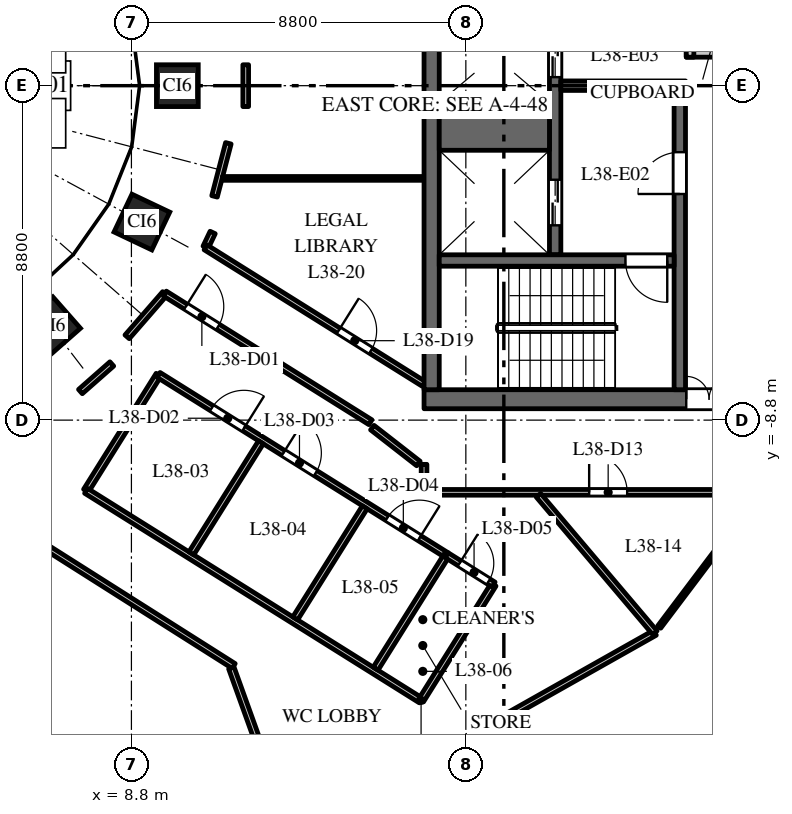
"""IFC4 building model, lengths in metres.
Left out: names, types, materials, properties, quantities, classifications, styles, units other than length and angle.
Written with IfcOpenShell. Run it as: python <this file> out.ifc"""

import sys

from ifc_helpers import new_model, si_unit, direction, frame, frame_2d, origin, origin_2d, place, context, subcontext, project, spatial, rectangle, extrude, element, fill, save


model = new_model("IFC4")
c1 = context("Model", 3, precision=1e-05, world=origin(), true_north=direction((0.0, 1.0)))
c2 = subcontext(c1, "Body", "Model", "MODEL_VIEW")
j1 = project(units=[si_unit("LENGTHUNIT", "METRE"), si_unit("PLANEANGLEUNIT", "RADIAN")], contexts=[c1])
p1 = place(None, origin())
s1 = spatial("IfcSite", under=j1, at=p1, CompositionType="ELEMENT")
p2 = place(p1, origin())
s2 = spatial("IfcBuilding", under=s1, at=p2, CompositionType="ELEMENT")
p3 = place(p2, frame((0.0, 0.0, 166.0)))
s3 = spatial("IfcBuildingStorey", under=s2, at=p3, CompositionType="ELEMENT", Elevation=166.0)
for number, where, z_axis, x_axis in (
    (1, (10.008, 0.0, 0.0), (0.0, 0.0, 1.0), (0.0, 1.0, 0.0)),
    (2, (6.682, -6.334, 0.0), (0.0, 0.0, 1.0), (0.751, 0.66, 0.0)),
    (3, (9.076, -3.588, 0.0), (0.0, 0.0, 1.0), (0.429, 0.903, 0.0)),
):
    element("IfcColumn", number, at=place(p3, frame(where, z_axis=z_axis, x_axis=x_axis)), inside=s3, PredefinedType="COLUMN", context=c2, shape_type="SweptSolid", body=[
        extrude(rectangle(XDim=1.1, YDim=1.1, at=origin_2d()), origin(), (0.0, 0.0, 1.0), 4.0),
    ])
p4 = place(p3, frame((16.5, -8.25, 0.0), z_axis=(0.0, 0.0, 1.0), x_axis=(1.0, 0.0, 0.0)))
e4 = element("IfcWall", 4, at=p4, inside=s3, PredefinedType="SHEAR", context=c2, shape_type="SweptSolid", body=[
    extrude(rectangle(XDim=15.0, YDim=0.5, at=frame_2d((7.5, 0.0))), origin(), (0.0, 0.0, 1.0), 3.7),
])
p5 = place(p4, frame((6.9, 0.0, 0.0)))
e5 = element("IfcOpeningElement", 5, at=p5, cuts=e4, PredefinedType="OPENING", context=c2, shape_type="SweptSolid", body=[
    extrude(rectangle(XDim=1.2, YDim=2.1, at=frame_2d((0.6, 1.05))), frame((0.0, 0.26, 0.0), z_axis=(0.0, -1.0, 0.0), x_axis=(1.0, 0.0, 0.0)), (0.0, 0.0, 1.0), 0.52),
])
p6 = place(p4, frame((12.95, 0.0, 0.0)))
e6 = element("IfcOpeningElement", 6, at=p6, cuts=e4, PredefinedType="OPENING", context=c2, shape_type="SweptSolid", body=[
    extrude(rectangle(XDim=0.9, YDim=2.1, at=frame_2d((0.45, 1.05))), frame((0.0, 0.26, 0.0), z_axis=(0.0, -1.0, 0.0), x_axis=(1.0, 0.0, 0.0)), (0.0, 0.0, 1.0), 0.52),
])
p7 = place(p3, frame((19.95, -4.45, 0.0), z_axis=(0.0, 0.0, 1.0), x_axis=(0.0, 1.0, 0.0)))
e7 = element("IfcWall", 7, at=p7, inside=s3, PredefinedType="SHEAR", context=c2, shape_type="SweptSolid", body=[
    extrude(rectangle(XDim=8.9, YDim=0.3, at=frame_2d((4.45, 0.0))), origin(), (0.0, 0.0, 1.0), 3.7),
])
p8 = place(p7, frame((0.775, 0.0, 0.0)))
e8 = element("IfcOpeningElement", 8, at=p8, cuts=e7, PredefinedType="OPENING", context=c2, shape_type="SweptSolid", body=[
    extrude(rectangle(XDim=1.2, YDim=2.1, at=frame_2d((0.6, 1.05))), frame((0.0, 0.16, 0.0), z_axis=(0.0, -1.0, 0.0), x_axis=(1.0, 0.0, 0.0)), (0.0, 0.0, 1.0), 0.32),
])
p9 = place(p7, frame((4.675, 0.0, 0.0)))
e9 = element("IfcOpeningElement", 9, at=p9, cuts=e7, PredefinedType="OPENING", context=c2, shape_type="SweptSolid", body=[
    extrude(rectangle(XDim=1.1, YDim=2.1, at=frame_2d((0.55, 1.05))), frame((0.0, 0.16, 0.0), z_axis=(0.0, -1.0, 0.0), x_axis=(1.0, 0.0, 0.0)), (0.0, 0.0, 1.0), 0.32),
])
p10 = place(p7, frame((7.25, 0.0, 0.0)))
e10 = element("IfcOpeningElement", 10, at=p10, cuts=e7, PredefinedType="OPENING", context=c2, shape_type="SweptSolid", body=[
    extrude(rectangle(XDim=1.1, YDim=2.1, at=frame_2d((0.55, 1.05))), frame((0.0, 0.16, 0.0), z_axis=(0.0, -1.0, 0.0), x_axis=(1.0, 0.0, 0.0)), (0.0, 0.0, 1.0), 0.32),
])
p11 = place(p3, frame((20.1, 0.0, 0.0), z_axis=(0.0, 0.0, 1.0), x_axis=(1.0, 0.0, 0.0)))
e11 = element("IfcWall", 11, at=p11, inside=s3, PredefinedType="SHEAR", context=c2, shape_type="SweptSolid", body=[
    extrude(rectangle(XDim=3.28, YDim=0.25, at=frame_2d((1.64, 0.0))), origin(), (0.0, 0.0, 1.0), 3.7),
])
p12 = place(p3, frame((16.7, -8.0, 0.0), z_axis=(0.0, 0.0, 1.0), x_axis=(0.0, 1.0, 0.0)))
e12 = element("IfcWall", 12, at=p12, inside=s3, PredefinedType="SHEAR", context=c2, shape_type="SweptSolid", body=[
    extrude(rectangle(XDim=16.0, YDim=0.4, at=frame_2d((8.0, 0.0))), origin(), (0.0, 0.0, 1.0), 3.7),
])
p13 = place(p3, frame((23.4, 0.85, 0.0), z_axis=(0.0, 0.0, 1.0), x_axis=(1.0, 0.0, 0.0)))
e13 = element("IfcWall", 13, at=p13, inside=s3, PredefinedType="PARTITIONING", context=c2, shape_type="SweptSolid", body=[
    extrude(rectangle(XDim=1.2, YDim=0.2, at=frame_2d((0.6, 0.0))), origin(), (0.0, 0.0, 1.0), 3.7),
])
p14 = place(p3, frame((23.5, 0.75, 0.0), z_axis=(0.0, 0.0, 1.0), x_axis=(0.0, 1.0, 0.0)))
e14 = element("IfcWall", 14, at=p14, inside=s3, PredefinedType="PARTITIONING", context=c2, shape_type="SweptSolid", body=[
    extrude(rectangle(XDim=1.6, YDim=0.2, at=frame_2d((0.8, 0.0))), origin(), (0.0, 0.0, 1.0), 3.7),
])
p15 = place(p14, frame((0.25, 0.0, 0.0)))
e15 = element("IfcOpeningElement", 15, at=p15, cuts=e14, PredefinedType="OPENING", context=c2, shape_type="SweptSolid", body=[
    extrude(rectangle(XDim=0.9, YDim=2.1, at=frame_2d((0.45, 1.05))), frame((0.0, 0.11, 0.0), z_axis=(0.0, -1.0, 0.0), x_axis=(1.0, 0.0, 0.0)), (0.0, 0.0, 1.0), 0.22),
])
p16 = place(p3, frame((16.9, -1.075, 0.0), z_axis=(0.0, 0.0, 1.0), x_axis=(1.0, 0.0, 0.0)))
e16 = element("IfcWall", 16, at=p16, inside=s3, PredefinedType="SHEAR", context=c2, shape_type="SweptSolid", body=[
    extrude(rectangle(XDim=2.9, YDim=1.25, at=frame_2d((1.45, 0.0))), origin(), (0.0, 0.0, 1.0), 3.7),
])
p17 = place(p3, frame((23.23, -8.0, 0.0), z_axis=(0.0, 0.0, 1.0), x_axis=(0.0, 1.0, 0.0)))
e17 = element("IfcWall", 17, at=p17, inside=s3, PredefinedType="SHEAR", context=c2, shape_type="SweptSolid", body=[
    extrude(rectangle(XDim=7.875, YDim=0.3, at=frame_2d((3.938, 0.0))), origin(), (0.0, 0.0, 1.0), 3.7),
])
p18 = place(p17, frame((5.15, 0.0, 0.0)))
e18 = element("IfcOpeningElement", 18, at=p18, cuts=e17, PredefinedType="OPENING", context=c2, shape_type="SweptSolid", body=[
    extrude(rectangle(XDim=1.1, YDim=2.1, at=frame_2d((0.55, 1.05))), frame((0.0, 0.16, 0.0), z_axis=(0.0, -1.0, 0.0), x_axis=(1.0, 0.0, 0.0)), (0.0, 0.0, 1.0), 0.32),
])
p19 = place(p3, frame((16.9, -4.6, 0.0), z_axis=(0.0, 0.0, 1.0), x_axis=(1.0, 0.0, 0.0)))
e19 = element("IfcWall", 19, at=p19, inside=s3, PredefinedType="SHEAR", context=c2, shape_type="SweptSolid", body=[
    extrude(rectangle(XDim=6.18, YDim=0.3, at=frame_2d((3.09, 0.0))), origin(), (0.0, 0.0, 1.0), 3.7),
])
p20 = place(p19, frame((4.9, 0.0, 0.0)))
e20 = element("IfcOpeningElement", 20, at=p20, cuts=e19, PredefinedType="OPENING", context=c2, shape_type="SweptSolid", body=[
    extrude(rectangle(XDim=1.1, YDim=2.1, at=frame_2d((0.55, 1.05))), frame((0.0, 0.16, 0.0), z_axis=(0.0, -1.0, 0.0), x_axis=(1.0, 0.0, 0.0)), (0.0, 0.0, 1.0), 0.32),
])
p21 = place(p3, frame((3.036, -9.915, 0.0), z_axis=(0.0, 0.0, 1.0), x_axis=(0.844814664865, -0.535059045367, 0.0)))
e21 = element("IfcWall", 21, at=p21, inside=s3, PredefinedType="PARTITIONING", context=c2, shape_type="SweptSolid", body=[
    extrude(rectangle(XDim=10.008, YDim=0.15, at=frame_2d((5.004, 0.0))), origin(), (0.0, 0.0, 1.0), 2.85),
])
p22 = place(p3, frame((7.458, -8.049, 0.0), z_axis=(0.0, 0.0, 1.0), x_axis=(0.75060787095, 0.660747927782, 0.0)))
e22 = element("IfcWall", 22, at=p22, inside=s3, PredefinedType="PARTITIONING", context=c2, shape_type="SweptSolid", body=[
    extrude(rectangle(XDim=1.1, YDim=0.15, at=frame_2d((0.55, 0.0))), origin(), (0.0, 0.0, 1.0), 3.7),
])
p23 = place(p3, frame((7.605, -10.659, 0.0), z_axis=(0.0, 0.0, 1.0), x_axis=(0.530602380468, 0.847620855006, 0.0)))
e23 = element("IfcWall", 23, at=p23, inside=s3, PredefinedType="PARTITIONING", context=c2, shape_type="SweptSolid", body=[
    extrude(rectangle(XDim=3.6, YDim=0.15, at=frame_2d((1.8, 0.0))), origin(), (0.0, 0.0, 1.0), 3.7),
])
p24 = place(p3, frame((7.608, -10.661, 0.0), z_axis=(0.0, 0.0, 1.0), x_axis=(0.847562482532, -0.530695617284, 0.0)))
e24 = element("IfcWall", 24, at=p24, inside=s3, PredefinedType="PARTITIONING", context=c2, shape_type="SweptSolid", body=[
    extrude(rectangle(XDim=10.392, YDim=0.15, at=frame_2d((5.196, 0.0))), origin(), (0.0, 0.0, 1.0), 3.7),
])
p25 = place(p3, frame((8.687, -6.609, 0.0), z_axis=(0.0, 0.0, 1.0), x_axis=(0.656454677423, 0.75436546613, 0.0)))
e25 = element("IfcWall", 25, at=p25, inside=s3, PredefinedType="PARTITIONING", context=c2, shape_type="SweptSolid", body=[
    extrude(rectangle(XDim=1.511, YDim=0.15, at=frame_2d((0.755, 0.0))), origin(), (0.0, 0.0, 1.0), 3.7),
])
p26 = place(p3, frame((9.514, -7.61, 0.0), z_axis=(0.0, 0.0, 1.0), x_axis=(0.847740567707, -0.530411095155, 0.0)))
e26 = element("IfcWall", 26, at=p26, inside=s3, PredefinedType="PARTITIONING", context=c2, shape_type="SweptSolid", body=[
    extrude(rectangle(XDim=8.944, YDim=0.15, at=frame_2d((4.472, 0.0))), origin(), (0.0, 0.0, 1.0), 3.7),
])
p27 = place(p26, frame((1.65, 0.0, 0.0)))
e27 = element("IfcOpeningElement", 27, at=p27, cuts=e26, PredefinedType="OPENING", context=c2, shape_type="SweptSolid", body=[
    extrude(rectangle(XDim=1.0, YDim=2.1, at=frame_2d((0.5, 1.05))), frame((0.0, 0.085, 0.0), z_axis=(0.0, -1.0, 0.0), x_axis=(1.0, 0.0, 0.0)), (0.0, 0.0, 1.0), 0.17),
])
p28 = place(p26, frame((3.874, 0.0, 0.0)))
e28 = element("IfcOpeningElement", 28, at=p28, cuts=e26, PredefinedType="OPENING", context=c2, shape_type="SweptSolid", body=[
    extrude(rectangle(XDim=1.0, YDim=2.1, at=frame_2d((0.5, 1.05))), frame((0.0, 0.085, 0.0), z_axis=(0.0, -1.0, 0.0), x_axis=(1.0, 0.0, 0.0)), (0.0, 0.0, 1.0), 0.17),
])
p29 = place(p26, frame((7.098, 0.0, 0.0)))
e29 = element("IfcOpeningElement", 29, at=p29, cuts=e26, PredefinedType="OPENING", context=c2, shape_type="SweptSolid", body=[
    extrude(rectangle(XDim=1.0, YDim=2.1, at=frame_2d((0.5, 1.05))), frame((0.0, 0.085, 0.0), z_axis=(0.0, -1.0, 0.0), x_axis=(1.0, 0.0, 0.0)), (0.0, 0.0, 1.0), 0.17),
])
p30 = place(p3, frame((9.679, -5.469, 0.0), z_axis=(0.0, 0.0, 1.0), x_axis=(0.847602682855, -0.530631408811, 0.0)))
e30 = element("IfcWall", 30, at=p30, inside=s3, PredefinedType="PARTITIONING", context=c2, shape_type="SweptSolid", body=[
    extrude(rectangle(XDim=6.383, YDim=0.15, at=frame_2d((3.191, 0.0))), origin(), (0.0, 0.0, 1.0), 3.7),
])
p31 = place(p30, frame((0.65, 0.0, 0.0)))
e31 = element("IfcOpeningElement", 31, at=p31, cuts=e30, PredefinedType="OPENING", context=c2, shape_type="SweptSolid", body=[
    extrude(rectangle(XDim=1.0, YDim=2.1, at=frame_2d((0.5, 1.05))), frame((0.0, 0.085, 0.0), z_axis=(0.0, -1.0, 0.0), x_axis=(1.0, 0.0, 0.0)), (0.0, 0.0, 1.0), 0.17),
])
p32 = place(p3, frame((10.377, -12.306, 0.0), z_axis=(0.0, 0.0, 1.0), x_axis=(0.530889428354, 0.847441098167, 0.0)))
e32 = element("IfcWall", 32, at=p32, inside=s3, PredefinedType="PARTITIONING", context=c2, shape_type="SweptSolid", body=[
    extrude(rectangle(XDim=3.449, YDim=0.15, at=frame_2d((1.725, 0.0))), origin(), (0.0, 0.0, 1.0), 3.7),
])
p33 = place(p3, frame((10.752, -4.254, 0.0), z_axis=(0.0, 0.0, 1.0), x_axis=(0.429758433873, 0.90294390109, 0.0)))
e33 = element("IfcWall", 33, at=p33, inside=s3, PredefinedType="PARTITIONING", context=c2, shape_type="SweptSolid", body=[
    extrude(rectangle(XDim=0.433, YDim=0.15, at=frame_2d((0.216, 0.0))), origin(), (0.0, 0.0, 1.0), 3.7),
])
p34 = place(p3, frame((10.752, -4.254, 0.0), z_axis=(0.0, 0.0, 1.0), x_axis=(0.847690706888, -0.530490777917, 0.0)))
e34 = element("IfcWall", 34, at=p34, inside=s3, PredefinedType="PARTITIONING", context=c2, shape_type="SweptSolid", body=[
    extrude(rectangle(XDim=6.781, YDim=0.15, at=frame_2d((3.39, 0.0))), origin(), (0.0, 0.0, 1.0), 3.7),
])
p35 = place(p34, frame((4.129, 0.0, 0.0)))
e35 = element("IfcOpeningElement", 35, at=p35, cuts=e34, PredefinedType="OPENING", context=c2, shape_type="SweptSolid", body=[
    extrude(rectangle(XDim=1.0, YDim=2.1, at=frame_2d((0.5, 1.05))), frame((0.0, 0.085, 0.0), z_axis=(0.0, -1.0, 0.0), x_axis=(1.0, 0.0, 0.0)), (0.0, 0.0, 1.0), 0.17),
])
p36 = place(p3, frame((10.987, -2.913, 0.0), z_axis=(0.0, 0.0, 1.0), x_axis=(0.252153395539, 0.967687276509, 0.0)))
e36 = element("IfcWall", 36, at=p36, inside=s3, PredefinedType="PARTITIONING", context=c2, shape_type="SweptSolid", body=[
    extrude(rectangle(XDim=1.444, YDim=0.15, at=frame_2d((0.722, 0.0))), origin(), (0.0, 0.0, 1.0), 3.7),
])
p37 = place(p3, frame((11.193, -2.44, 0.0), z_axis=(0.0, 0.0, 1.0), x_axis=(1.0, 0.0, 0.0)))
e37 = element("IfcWall", 37, at=p37, inside=s3, PredefinedType="PARTITIONING", context=c2, shape_type="SweptSolid", body=[
    extrude(rectangle(XDim=5.307, YDim=0.1, at=frame_2d((2.653, 0.0))), origin(), (0.0, 0.0, 1.0), 3.7),
])
p38 = place(p3, frame((11.429, -15.32, 0.0), z_axis=(0.0, 0.0, 1.0), x_axis=(0.338520464006, -0.940959029634, 0.0)))
e38 = element("IfcWall", 38, at=p38, inside=s3, PredefinedType="PARTITIONING", context=c2, shape_type="SweptSolid", body=[
    extrude(rectangle(XDim=4.735, YDim=0.15, at=frame_2d((2.368, 0.0))), origin(), (0.0, 0.0, 1.0), 3.7),
])
p39 = place(p3, frame((11.808, -0.55, 0.0), z_axis=(0.0, 0.0, 1.0), x_axis=(0.0, 1.0, 0.0)))
e39 = element("IfcWall", 39, at=p39, inside=s3, PredefinedType="PARTITIONING", context=c2, shape_type="SweptSolid", body=[
    extrude(rectangle(XDim=1.1, YDim=0.15, at=frame_2d((0.55, 0.0))), origin(), (0.0, 0.0, 1.0), 3.7),
])
p40 = place(p3, frame((13.034, -19.779, 0.0), z_axis=(0.0, 0.0, 1.0), x_axis=(0.870903388322, 0.491454258512, 0.0)))
e40 = element("IfcWall", 40, at=p40, inside=s3, PredefinedType="PARTITIONING", context=c2, shape_type="SweptSolid", body=[
    extrude(rectangle(XDim=10.955, YDim=0.15, at=frame_2d((5.478, 0.0))), origin(), (0.0, 0.0, 1.0), 3.7),
])
p41 = place(p3, frame((13.11, -14.017, 0.0), z_axis=(0.0, 0.0, 1.0), x_axis=(0.530603340991, 0.847620253727, 0.0)))
e41 = element("IfcWall", 41, at=p41, inside=s3, PredefinedType="PARTITIONING", context=c2, shape_type="SweptSolid", body=[
    extrude(rectangle(XDim=3.448, YDim=0.15, at=frame_2d((1.724, 0.0))), origin(), (0.0, 0.0, 1.0), 3.7),
])
p42 = place(p3, frame((15.226, -15.341, 0.0), z_axis=(0.0, 0.0, 1.0), x_axis=(0.530602850446, 0.847620560805, 0.0)))
e42 = element("IfcWall", 42, at=p42, inside=s3, PredefinedType="PARTITIONING", context=c2, shape_type="SweptSolid", body=[
    extrude(rectangle(XDim=3.524, YDim=0.15, at=frame_2d((1.762, 0.0))), origin(), (0.0, 0.0, 1.0), 3.7),
])
p43 = place(p3, frame((16.422, -16.175, 0.0), z_axis=(0.0, 0.0, 1.0), x_axis=(0.530578570881, 0.84763575911, 0.0)))
e43 = element("IfcWall", 43, at=p43, inside=s3, PredefinedType="PARTITIONING", context=c2, shape_type="SweptSolid", body=[
    extrude(rectangle(XDim=3.596, YDim=0.15, at=frame_2d((1.798, 0.0))), origin(), (0.0, 0.0, 1.0), 3.7),
])
p44 = place(p3, frame((16.5, -10.7, 0.0), z_axis=(0.0, 0.0, 1.0), x_axis=(0.0, 1.0, 0.0)))
e44 = element("IfcWall", 44, at=p44, inside=s3, PredefinedType="PARTITIONING", context=c2, shape_type="SweptSolid", body=[
    extrude(rectangle(XDim=0.736, YDim=0.15, at=frame_2d((0.368, 0.0))), origin(), (0.0, 0.0, 1.0), 3.7),
])
p45 = place(p3, frame((16.5, -10.7, 0.0), z_axis=(0.0, 0.0, 1.0), x_axis=(1.0, 0.0, 0.0)))
e45 = element("IfcWall", 45, at=p45, inside=s3, PredefinedType="PARTITIONING", context=c2, shape_type="SweptSolid", body=[
    extrude(rectangle(XDim=15.0, YDim=0.15, at=frame_2d((7.5, 0.0))), origin(), (0.0, 0.0, 1.0), 2.75),
])
p46 = place(p45, frame((4.345, 0.0, 0.0)))
e46 = element("IfcOpeningElement", 46, at=p46, cuts=e45, PredefinedType="OPENING", context=c2, shape_type="SweptSolid", body=[
    extrude(rectangle(XDim=1.0, YDim=2.1, at=frame_2d((0.5, 1.05))), frame((0.0, 0.085, 0.0), z_axis=(0.0, -1.0, 0.0), x_axis=(1.0, 0.0, 0.0)), (0.0, 0.0, 1.0), 0.17),
])
p47 = place(p45, frame((9.505, 0.0, 0.0)))
e47 = element("IfcOpeningElement", 47, at=p47, cuts=e45, PredefinedType="OPENING", context=c2, shape_type="SweptSolid", body=[
    extrude(rectangle(XDim=1.0, YDim=2.1, at=frame_2d((0.5, 1.05))), frame((0.0, 0.085, 0.0), z_axis=(0.0, -1.0, 0.0), x_axis=(1.0, 0.0, 0.0)), (0.0, 0.0, 1.0), 0.17),
])
p48 = place(p3, frame((17.096, -12.354, 0.0), z_axis=(0.0, 0.0, 1.0), x_axis=(0.847498728789, -0.530797423412, 0.0)))
e48 = element("IfcWall", 48, at=p48, inside=s3, PredefinedType="PARTITIONING", context=c2, shape_type="SweptSolid", body=[
    extrude(rectangle(XDim=1.456, YDim=0.15, at=frame_2d((0.728, 0.0))), origin(), (0.0, 0.0, 1.0), 3.7),
])
p49 = place(p48, frame((0.4, 0.0, 0.0)))
e49 = element("IfcOpeningElement", 49, at=p49, cuts=e48, PredefinedType="OPENING", context=c2, shape_type="SweptSolid", body=[
    extrude(rectangle(XDim=0.9, YDim=2.1, at=frame_2d((0.45, 1.05))), frame((0.0, 0.085, 0.0), z_axis=(0.0, -1.0, 0.0), x_axis=(1.0, 0.0, 0.0)), (0.0, 0.0, 1.0), 0.17),
])
p50 = place(p3, frame((19.511, -10.778, 0.0), z_axis=(0.0, 0.0, 1.0), x_axis=(0.646369264436, -0.763024753197, 0.0)))
e50 = element("IfcWall", 50, at=p50, inside=s3, PredefinedType="PARTITIONING", context=c2, shape_type="SweptSolid", body=[
    extrude(rectangle(XDim=4.74, YDim=0.15, at=frame_2d((2.37, 0.0))), origin(), (0.0, 0.0, 1.0), 3.7),
])
p51 = place(p3, frame((22.688, -14.245, 0.0), z_axis=(0.0, 0.0, 1.0), x_axis=(0.6020222506, 0.798479310804, 0.0)))
e51 = element("IfcWall", 51, at=p51, inside=s3, PredefinedType="PARTITIONING", context=c2, shape_type="SweptSolid", body=[
    extrude(rectangle(XDim=4.342, YDim=0.1, at=frame_2d((2.171, 0.0))), origin(), (0.0, 0.0, 1.0), 2.75),
])
p52 = place(p3, frame((16.352, -9.942, 0.0), z_axis=(0.0, 0.0, 1.0), x_axis=(-0.788950226826, 0.614457109643, 0.0)))
e52 = element("IfcWall", 52, at=p52, inside=s3, PredefinedType="PARTITIONING", context=c2, shape_type="SweptSolid", body=[
    extrude(rectangle(XDim=1.538, YDim=0.15, at=frame_2d((0.769, 0.0))), origin(), (0.0, 0.0, 1.0), 3.7),
])
p53 = place(p8, origin())
e53 = element("IfcDoor", 53, at=p53, inside=s3, OperationType="DOUBLE_DOOR_SLIDING", PredefinedType="DOOR", context=c2, shape_type="SweptSolid", body=[
    extrude(rectangle(XDim=1.2, YDim=2.1, at=frame_2d((0.6, 1.05))), frame((0.0, 0.025, 0.0), z_axis=(0.0, -1.0, 0.0), x_axis=(1.0, 0.0, 0.0)), (0.0, 0.0, 1.0), 0.05),
])
fill(e8, e53)
p54 = place(p9, origin())
e54 = element("IfcDoor", 54, at=p54, inside=s3, OperationType="DOUBLE_DOOR_SLIDING", PredefinedType="DOOR", context=c2, shape_type="SweptSolid", body=[
    extrude(rectangle(XDim=1.1, YDim=2.1, at=frame_2d((0.55, 1.05))), frame((0.0, 0.025, 0.0), z_axis=(0.0, -1.0, 0.0), x_axis=(1.0, 0.0, 0.0)), (0.0, 0.0, 1.0), 0.05),
])
fill(e9, e54)
p55 = place(p20, origin())
e55 = element("IfcDoor", 55, at=p55, inside=s3, OperationType="SINGLE_SWING_RIGHT", PredefinedType="DOOR", context=c2, shape_type="SweptSolid", body=[
    extrude(rectangle(XDim=1.1, YDim=2.1, at=frame_2d((0.55, 1.05))), frame((0.0, 0.025, 0.0), z_axis=(0.0, -1.0, 0.0), x_axis=(1.0, 0.0, 0.0)), (0.0, 0.0, 1.0), 0.05),
])
fill(e20, e55)
p56 = place(p18, origin())
e56 = element("IfcDoor", 56, at=p56, inside=s3, OperationType="SINGLE_SWING_RIGHT", PredefinedType="DOOR", context=c2, shape_type="SweptSolid", body=[
    extrude(rectangle(XDim=1.1, YDim=2.1, at=frame_2d((0.55, 1.05))), frame((0.0, 0.025, 0.0), z_axis=(0.0, -1.0, 0.0), x_axis=(1.0, 0.0, 0.0)), (0.0, 0.0, 1.0), 0.05),
])
fill(e18, e56)
p57 = place(p5, origin())
e57 = element("IfcDoor", 57, at=p57, inside=s3, OperationType="DOUBLE_DOOR_DOUBLE_SWING", PredefinedType="DOOR", context=c2, shape_type="SweptSolid", body=[
    extrude(rectangle(XDim=1.2, YDim=2.1, at=frame_2d((0.6, 1.05))), frame((0.0, 0.025, 0.0), z_axis=(0.0, -1.0, 0.0), x_axis=(1.0, 0.0, 0.0)), (0.0, 0.0, 1.0), 0.05),
])
fill(e5, e57)
p58 = place(p31, origin())
e58 = element("IfcDoor", 58, at=p58, inside=s3, OperationType="SINGLE_SWING_LEFT", PredefinedType="DOOR", context=c2, shape_type="SweptSolid", body=[
    extrude(rectangle(XDim=1.0, YDim=2.1, at=frame_2d((0.5, 1.05))), frame((0.0, 0.025, 0.0), z_axis=(0.0, -1.0, 0.0), x_axis=(1.0, 0.0, 0.0)), (0.0, 0.0, 1.0), 0.05),
])
fill(e31, e58)
p59 = place(p27, origin())
e59 = element("IfcDoor", 59, at=p59, inside=s3, OperationType="SINGLE_SWING_RIGHT", PredefinedType="DOOR", context=c2, shape_type="SweptSolid", body=[
    extrude(rectangle(XDim=1.0, YDim=2.1, at=frame_2d((0.5, 1.05))), frame((0.0, 0.025, 0.0), z_axis=(0.0, -1.0, 0.0), x_axis=(1.0, 0.0, 0.0)), (0.0, 0.0, 1.0), 0.05),
])
fill(e27, e59)
p60 = place(p28, origin())
e60 = element("IfcDoor", 60, at=p60, inside=s3, OperationType="SINGLE_SWING_LEFT", PredefinedType="DOOR", context=c2, shape_type="SweptSolid", body=[
    extrude(rectangle(XDim=1.0, YDim=2.1, at=frame_2d((0.5, 1.05))), frame((0.0, 0.025, 0.0), z_axis=(0.0, -1.0, 0.0), x_axis=(1.0, 0.0, 0.0)), (0.0, 0.0, 1.0), 0.05),
])
fill(e28, e60)
p61 = place(p29, origin())
e61 = element("IfcDoor", 61, at=p61, inside=s3, OperationType="SINGLE_SWING_RIGHT", PredefinedType="DOOR", context=c2, shape_type="SweptSolid", body=[
    extrude(rectangle(XDim=1.0, YDim=2.1, at=frame_2d((0.5, 1.05))), frame((0.0, 0.025, 0.0), z_axis=(0.0, -1.0, 0.0), x_axis=(1.0, 0.0, 0.0)), (0.0, 0.0, 1.0), 0.05),
])
fill(e29, e61)
p62 = place(p49, origin())
e62 = element("IfcDoor", 62, at=p62, inside=s3, OperationType="SINGLE_SWING_LEFT", PredefinedType="DOOR", context=c2, shape_type="SweptSolid", body=[
    extrude(rectangle(XDim=0.9, YDim=2.1, at=frame_2d((0.45, 1.05))), frame((0.0, 0.025, 0.0), z_axis=(0.0, -1.0, 0.0), x_axis=(1.0, 0.0, 0.0)), (0.0, 0.0, 1.0), 0.05),
])
fill(e49, e62)
p63 = place(p46, origin())
e63 = element("IfcDoor", 63, at=p63, inside=s3, OperationType="SINGLE_SWING_LEFT", PredefinedType="DOOR", context=c2, shape_type="SweptSolid", body=[
    extrude(rectangle(XDim=1.0, YDim=2.1, at=frame_2d((0.5, 1.05))), frame((0.0, 0.025, 0.0), z_axis=(0.0, -1.0, 0.0), x_axis=(1.0, 0.0, 0.0)), (0.0, 0.0, 1.0), 0.05),
])
fill(e46, e63)
p64 = place(p35, origin())
e64 = element("IfcDoor", 64, at=p64, inside=s3, OperationType="SINGLE_SWING_LEFT", PredefinedType="DOOR", context=c2, shape_type="SweptSolid", body=[
    extrude(rectangle(XDim=1.0, YDim=2.1, at=frame_2d((0.5, 1.05))), frame((0.0, 0.025, 0.0), z_axis=(0.0, -1.0, 0.0), x_axis=(1.0, 0.0, 0.0)), (0.0, 0.0, 1.0), 0.05),
])
fill(e35, e64)
save(model, sys.argv[1])
